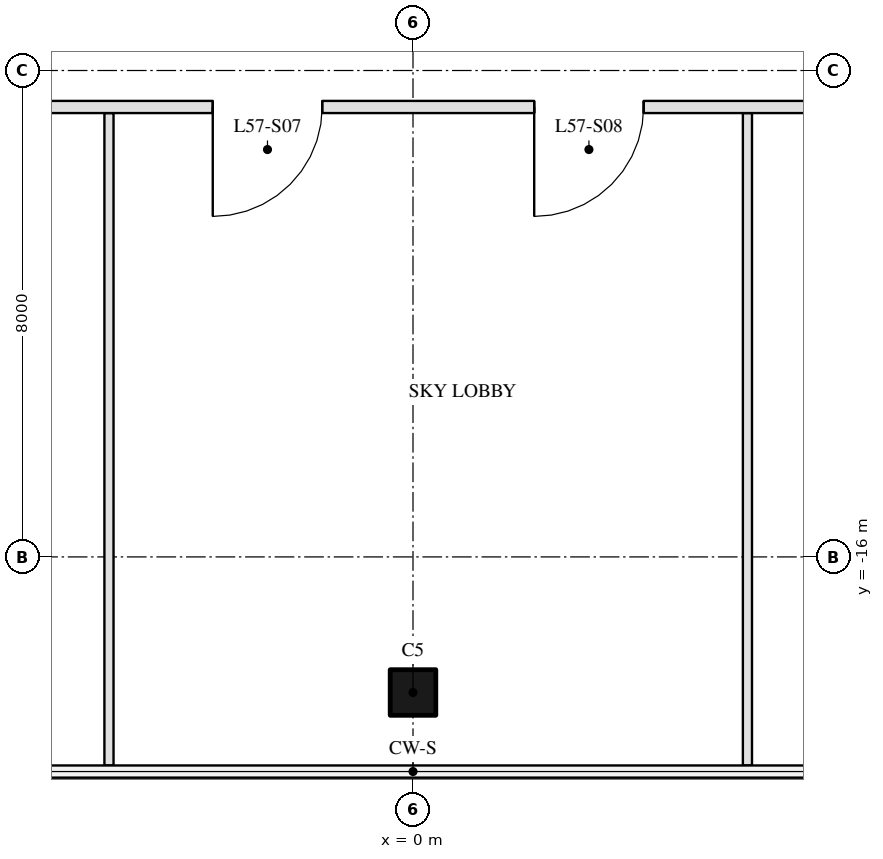
"""IFC4 building model, lengths in metres.
Left out: names, types, materials, properties, quantities, classifications, styles, units other than length and angle.
Written with IfcOpenShell. Run it as: python <this file> out.ifc"""

import sys

from ifc_helpers import new_model, si_unit, direction, frame, frame_2d, origin, origin_2d, place, context, subcontext, project, spatial, rectangle, hollow_rectangle, extrude, element, fill, save


model = new_model("IFC4")
c1 = context("Model", 3, precision=1e-05, world=origin(), true_north=direction((0.0, 1.0)))
c2 = subcontext(c1, "Body", "Model", "MODEL_VIEW")
j1 = project(units=[si_unit("LENGTHUNIT", "METRE"), si_unit("PLANEANGLEUNIT", "RADIAN")], contexts=[c1])
p1 = place(None, origin())
s1 = spatial("IfcSite", under=j1, at=p1, CompositionType="ELEMENT")
p2 = place(p1, origin())
s2 = spatial("IfcBuilding", under=s1, at=p2, CompositionType="ELEMENT")
p3 = place(p2, frame((0.0, 0.0, 231.7)))
s3 = spatial("IfcBuildingStorey", under=s2, at=p3, CompositionType="ELEMENT", Elevation=231.7)
p4 = place(p3, frame((0.0, -18.23, 0.0), z_axis=(0.0, 0.0, 1.0), x_axis=(-1.0, 0.0, 0.0)))
e1 = element("IfcColumn", 1, at=p4, inside=s3, PredefinedType="COLUMN", context=c2, shape_type="SweptSolid", body=[
    extrude(hollow_rectangle(XDim=0.75, YDim=0.75, WallThickness=0.035, at=origin_2d()), origin(), (0.0, 0.0, 1.0), 6.0),
])
for number, where, z_axis, x_axis in (
    (2, (-5.0, -19.43, 0.0), (0.0, 0.0, 1.0), (0.0, 1.0, 0.0)),
    (3, (5.5, -19.43, 0.0), (0.0, 0.0, 1.0), (0.0, 1.0, 0.0)),
):
    element("IfcWall", number, at=place(p3, frame(where, z_axis=z_axis, x_axis=x_axis)), inside=s3, PredefinedType="PARTITIONING", context=c2, shape_type="SweptSolid", body=[
        extrude(rectangle(XDim=10.73, YDim=0.15, at=frame_2d((5.365, 0.0))), origin(), (0.0, 0.0, 1.0), 5.7),
    ])
p5 = place(p3, frame((-9.93, -8.6, 0.0), z_axis=(0.0, 0.0, 1.0), x_axis=(1.0, 0.0, 0.0)))
e4 = element("IfcWall", 4, at=p5, inside=s3, PredefinedType="PARTITIONING", context=c2, shape_type="SweptSolid", body=[
    extrude(rectangle(XDim=19.861, YDim=0.2, at=frame_2d((9.93, 0.0))), origin(), (0.0, 0.0, 1.0), 4.91),
])
p6 = place(p5, frame((1.734, 0.0, 0.0)))
e5 = element("IfcOpeningElement", 5, at=p6, cuts=e4, PredefinedType="OPENING", context=c2, shape_type="SweptSolid", body=[
    extrude(rectangle(XDim=1.5, YDim=2.1, at=frame_2d((0.75, 1.05))), frame((0.0, 0.11, 0.0), z_axis=(0.0, -1.0, 0.0), x_axis=(1.0, 0.0, 0.0)), (0.0, 0.0, 1.0), 0.22),
])
p7 = place(p5, frame((6.637, 0.0, 0.0)))
e6 = element("IfcOpeningElement", 6, at=p7, cuts=e4, PredefinedType="OPENING", context=c2, shape_type="SweptSolid", body=[
    extrude(rectangle(XDim=1.8, YDim=2.4, at=frame_2d((0.9, 1.2))), frame((0.0, 0.11, 0.0), z_axis=(0.0, -1.0, 0.0), x_axis=(1.0, 0.0, 0.0)), (0.0, 0.0, 1.0), 0.22),
])
p8 = place(p5, frame((11.924, 0.0, 0.0)))
e7 = element("IfcOpeningElement", 7, at=p8, cuts=e4, PredefinedType="OPENING", context=c2, shape_type="SweptSolid", body=[
    extrude(rectangle(XDim=1.8, YDim=2.4, at=frame_2d((0.9, 1.2))), frame((0.0, 0.11, 0.0), z_axis=(0.0, -1.0, 0.0), x_axis=(1.0, 0.0, 0.0)), (0.0, 0.0, 1.0), 0.22),
])
p9 = place(p5, frame((17.028, 0.0, 0.0)))
e8 = element("IfcOpeningElement", 8, at=p9, cuts=e4, PredefinedType="OPENING", context=c2, shape_type="SweptSolid", body=[
    extrude(rectangle(XDim=1.2, YDim=2.1, at=frame_2d((0.6, 1.05))), frame((0.0, 0.11, 0.0), z_axis=(0.0, -1.0, 0.0), x_axis=(1.0, 0.0, 0.0)), (0.0, 0.0, 1.0), 0.22),
])
p10 = place(p7, frame((1.8, 0.0, 0.0), z_axis=(0.0, 0.0, 1.0), x_axis=(-1.0, 0.0, 0.0)))
e9 = element("IfcDoor", 9, at=p10, inside=s3, OperationType="DOUBLE_DOOR_SINGLE_SWING", PredefinedType="DOOR", context=c2, shape_type="SweptSolid", body=[
    extrude(rectangle(XDim=1.8, YDim=2.4, at=frame_2d((0.9, 1.2))), frame((0.0, 0.025, 0.0), z_axis=(0.0, -1.0, 0.0), x_axis=(1.0, 0.0, 0.0)), (0.0, 0.0, 1.0), 0.05),
])
fill(e6, e9)
p11 = place(p8, frame((1.8, 0.0, 0.0), z_axis=(0.0, 0.0, 1.0), x_axis=(-1.0, 0.0, 0.0)))
e10 = element("IfcDoor", 10, at=p11, inside=s3, OperationType="DOUBLE_DOOR_SINGLE_SWING", PredefinedType="DOOR", context=c2, shape_type="SweptSolid", body=[
    extrude(rectangle(XDim=1.8, YDim=2.4, at=frame_2d((0.9, 1.2))), frame((0.0, 0.025, 0.0), z_axis=(0.0, -1.0, 0.0), x_axis=(1.0, 0.0, 0.0)), (0.0, 0.0, 1.0), 0.05),
])
fill(e7, e10)
save(model, sys.argv[1])
